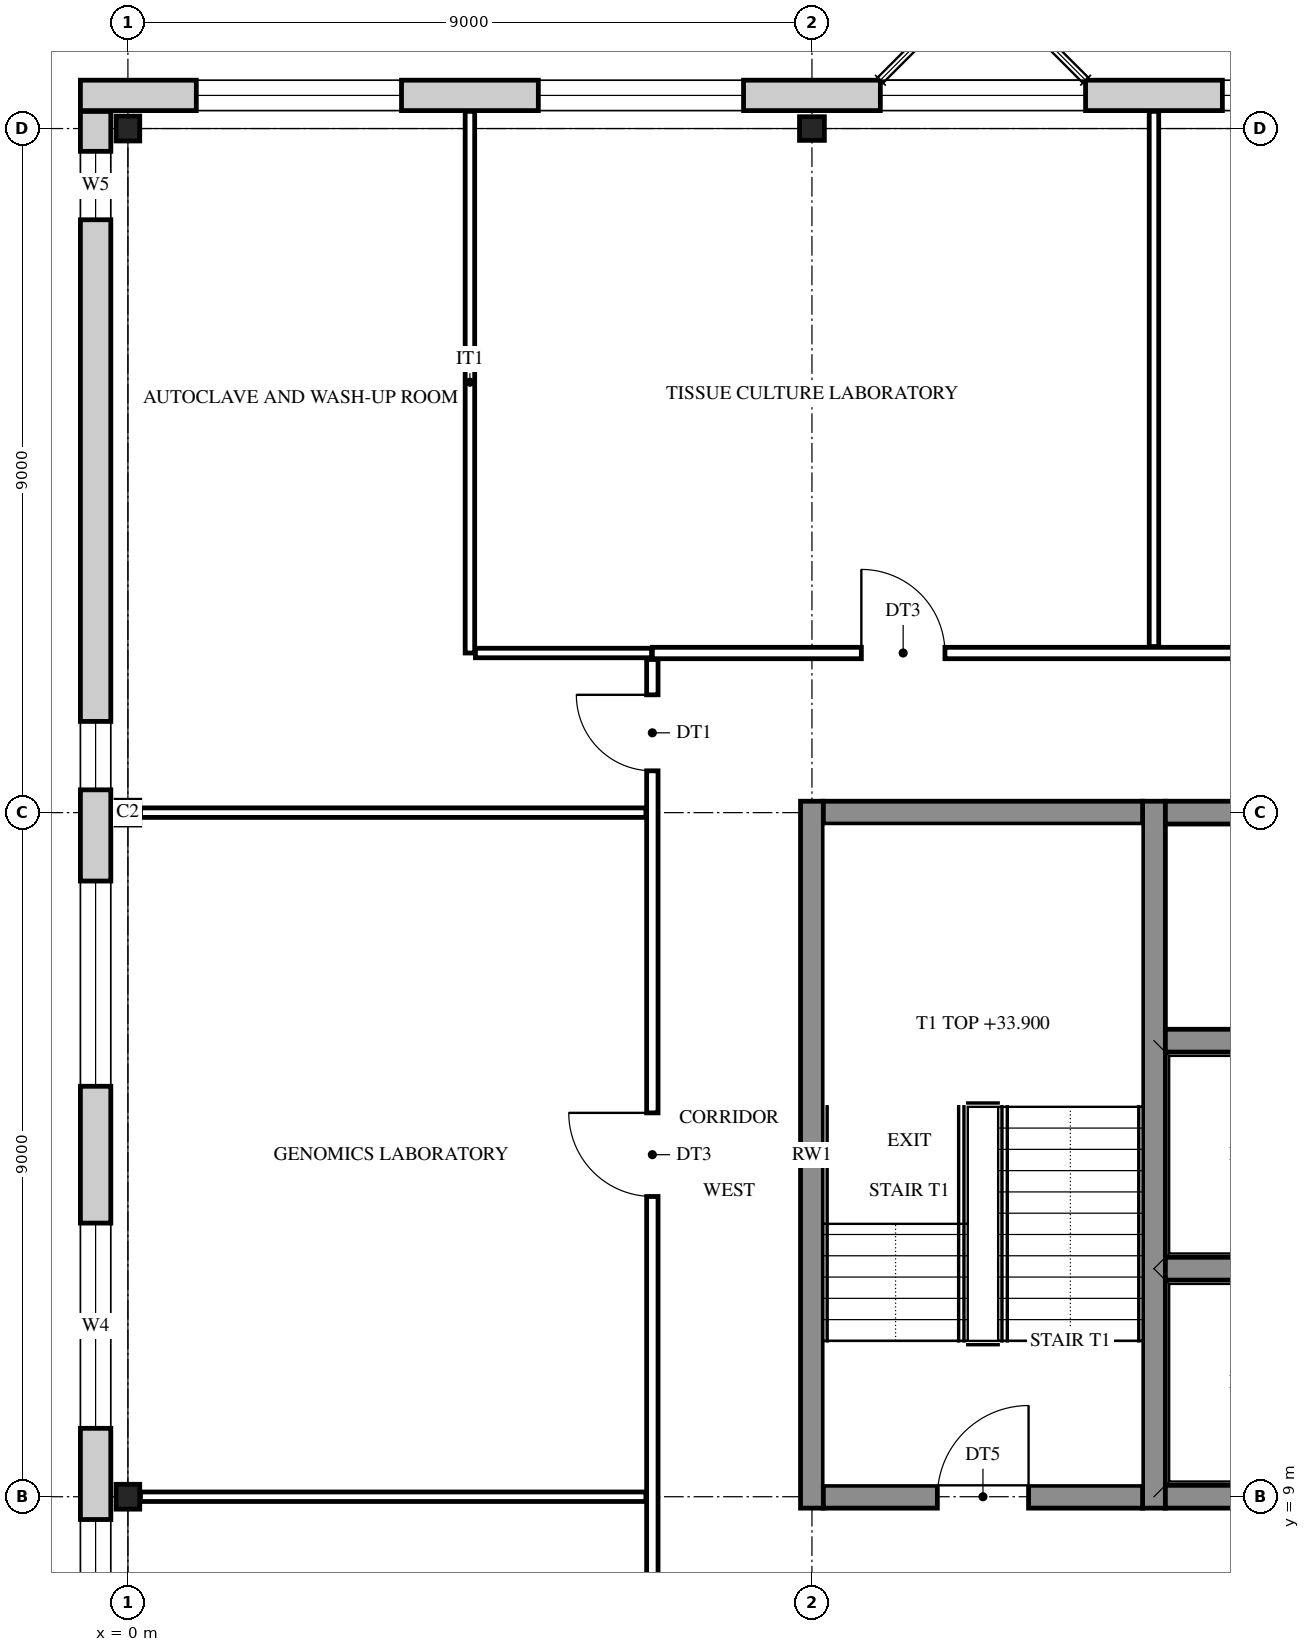
"""IFC4 building model, lengths in metres.
Left out: names, types, materials, properties, quantities, classifications, styles, units other than length and angle.
Written with IfcOpenShell. Run it as: python <this file> out.ifc"""

import sys

from ifc_helpers import new_model, si_unit, direction, frame, frame_2d, origin, origin_2d, place, context, subcontext, project, spatial, rectangle, i_section, extrude, element, fill, save


model = new_model("IFC4")
c1 = context("Model", 3, precision=1e-05, world=origin(), true_north=direction((0.0, 1.0)))
c2 = subcontext(c1, "Body", "Model", "MODEL_VIEW")
j1 = project(units=[si_unit("LENGTHUNIT", "METRE"), si_unit("PLANEANGLEUNIT", "RADIAN")], contexts=[c1])
p1 = place(None, origin())
s1 = spatial("IfcSite", under=j1, at=p1, CompositionType="ELEMENT")
p2 = place(p1, origin())
s2 = spatial("IfcBuilding", under=s1, at=p2, CompositionType="ELEMENT")
p3 = place(p2, frame((0.0, 0.0, 31.8)))
s3 = spatial("IfcBuildingStorey", under=s2, at=p3, CompositionType="ELEMENT", Elevation=31.8)
for number, where, z_axis, x_axis in (
    (1, (0.0, 9.0, 0.0), (0.0, 0.0, 1.0), (1.0, 0.0, 0.0)),
    (2, (0.0, 18.0, 0.0), (0.0, 0.0, 1.0), (1.0, 0.0, 0.0)),
    (3, (0.0, 27.0, 0.0), (0.0, 0.0, 1.0), (1.0, 0.0, 0.0)),
    (4, (9.0, 27.0, 0.0), (0.0, 0.0, 1.0), (0.0, 1.0, 0.0)),
):
    element("IfcColumn", number, at=place(p3, frame(where, z_axis=z_axis, x_axis=x_axis)), inside=s3, PredefinedType="COLUMN", context=c2, shape_type="SweptSolid", body=[
        extrude(i_section(OverallWidth=0.311, OverallDepth=0.327, WebThickness=0.016, FlangeThickness=0.025, FilletRadius=0.017, at=origin_2d()), origin(), (0.0, 0.0, 1.0), 4.2),
    ])
for number, where, z_axis, x_axis in (
    (5, (9.0, 8.85, 0.0), (0.0, 0.0, 1.0), (0.0, 1.0, 0.0)),
    (6, (13.5, 8.85, 0.0), (0.0, 0.0, 1.0), (0.0, 1.0, 0.0)),
):
    element("IfcWall", number, at=place(p3, frame(where, z_axis=z_axis, x_axis=x_axis)), inside=s3, PredefinedType="SHEAR", context=c2, shape_type="SweptSolid", body=[
        extrude(rectangle(XDim=9.3, YDim=0.3, at=frame_2d((4.65, 0.0))), origin(), (0.0, 0.0, 1.0), 4.2),
    ])
p4 = place(p3, frame((9.15, 9.0, 0.0), z_axis=(0.0, 0.0, 1.0), x_axis=(1.0, 0.0, 0.0)))
e7 = element("IfcWall", 7, at=p4, inside=s3, PredefinedType="SHEAR", context=c2, shape_type="SweptSolid", body=[
    extrude(rectangle(XDim=4.2, YDim=0.3, at=frame_2d((2.1, 0.0))), origin(), (0.0, 0.0, 1.0), 4.2),
])
p5 = place(p4, frame((1.5, 0.0, 0.0)))
e8 = element("IfcOpeningElement", 8, at=p5, cuts=e7, PredefinedType="OPENING", context=c2, shape_type="SweptSolid", body=[
    extrude(rectangle(XDim=1.2, YDim=2.1, at=frame_2d((0.6, 1.05))), frame((0.0, 0.16, 0.0), z_axis=(0.0, -1.0, 0.0), x_axis=(1.0, 0.0, 0.0)), (0.0, 0.0, 1.0), 0.32),
])
for number, where, z_axis, x_axis in (
    (9, (13.65, 9.0, 0.0), (0.0, 0.0, 1.0), (1.0, 0.0, 0.0)),
    (10, (13.65, 12.0, 0.0), (0.0, 0.0, 1.0), (1.0, 0.0, 0.0)),
    (11, (13.65, 15.0, 0.0), (0.0, 0.0, 1.0), (1.0, 0.0, 0.0)),
):
    element("IfcWall", number, at=place(p3, frame(where, z_axis=z_axis, x_axis=x_axis)), inside=s3, PredefinedType="SHEAR", context=c2, shape_type="SweptSolid", body=[
        extrude(rectangle(XDim=2.7, YDim=0.3, at=frame_2d((1.35, 0.0))), origin(), (0.0, 0.0, 1.0), 4.2),
    ])
p6 = place(p3, frame((9.15, 18.0, 0.0), z_axis=(0.0, 0.0, 1.0), x_axis=(1.0, 0.0, 0.0)))
e12 = element("IfcWall", 12, at=p6, inside=s3, PredefinedType="SHEAR", context=c2, shape_type="SweptSolid", body=[
    extrude(rectangle(XDim=4.2, YDim=0.3, at=frame_2d((2.1, 0.0))), origin(), (0.0, 0.0, 1.0), 4.2),
])
p7 = place(p3, frame((13.65, 18.0, 0.0), z_axis=(0.0, 0.0, 1.0), x_axis=(1.0, 0.0, 0.0)))
e13 = element("IfcWall", 13, at=p7, inside=s3, PredefinedType="SHEAR", context=c2, shape_type="SweptSolid", body=[
    extrude(rectangle(XDim=2.7, YDim=0.3, at=frame_2d((1.35, 0.0))), origin(), (0.0, 0.0, 1.0), 4.2),
])
p8 = place(p3, frame((-0.425, -0.225, 0.0), z_axis=(0.0, 0.0, 1.0), x_axis=(0.0, 1.0, 0.0)))
e14 = element("IfcWall", 14, at=p8, inside=s3, PredefinedType="STANDARD", context=c2, shape_type="SweptSolid", body=[
    extrude(rectangle(XDim=27.45, YDim=0.4, at=frame_2d((13.725, 0.0))), origin(), (0.0, 0.0, 1.0), 4.2),
])
p9 = place(p8, frame((0.525, 0.0, 0.9)))
e15 = element("IfcOpeningElement", 15, at=p9, cuts=e14, PredefinedType="OPENING", context=c2, shape_type="SweptSolid", body=[
    extrude(rectangle(XDim=0.9, YDim=2.0, at=frame_2d((0.45, 1.0))), frame((0.0, 0.21, 0.0), z_axis=(0.0, -1.0, 0.0), x_axis=(1.0, 0.0, 0.0)), (0.0, 0.0, 1.0), 0.42),
])
p10 = place(p8, frame((8.025, 0.0, 0.9)))
e16 = element("IfcOpeningElement", 16, at=p10, cuts=e14, PredefinedType="OPENING", context=c2, shape_type="SweptSolid", body=[
    extrude(rectangle(XDim=0.9, YDim=2.0, at=frame_2d((0.45, 1.0))), frame((0.0, 0.21, 0.0), z_axis=(0.0, -1.0, 0.0), x_axis=(1.0, 0.0, 0.0)), (0.0, 0.0, 1.0), 0.42),
])
p11 = place(p8, frame((10.125, 0.0, 0.9)))
e17 = element("IfcOpeningElement", 17, at=p11, cuts=e14, PredefinedType="OPENING", context=c2, shape_type="SweptSolid", body=[
    extrude(rectangle(XDim=2.7, YDim=2.5, at=frame_2d((1.35, 1.25))), frame((0.0, 0.21, 0.0), z_axis=(0.0, -1.0, 0.0), x_axis=(1.0, 0.0, 0.0)), (0.0, 0.0, 1.0), 0.42),
])
p12 = place(p8, frame((14.625, 0.0, 0.9)))
e18 = element("IfcOpeningElement", 18, at=p12, cuts=e14, PredefinedType="OPENING", context=c2, shape_type="SweptSolid", body=[
    extrude(rectangle(XDim=2.7, YDim=2.5, at=frame_2d((1.35, 1.25))), frame((0.0, 0.21, 0.0), z_axis=(0.0, -1.0, 0.0), x_axis=(1.0, 0.0, 0.0)), (0.0, 0.0, 1.0), 0.42),
])
p13 = place(p8, frame((18.525, 0.0, 0.9)))
e19 = element("IfcOpeningElement", 19, at=p13, cuts=e14, PredefinedType="OPENING", context=c2, shape_type="SweptSolid", body=[
    extrude(rectangle(XDim=0.9, YDim=2.0, at=frame_2d((0.45, 1.0))), frame((0.0, 0.21, 0.0), z_axis=(0.0, -1.0, 0.0), x_axis=(1.0, 0.0, 0.0)), (0.0, 0.0, 1.0), 0.42),
])
p14 = place(p8, frame((26.025, 0.0, 0.9)))
e20 = element("IfcOpeningElement", 20, at=p14, cuts=e14, PredefinedType="OPENING", context=c2, shape_type="SweptSolid", body=[
    extrude(rectangle(XDim=0.9, YDim=2.0, at=frame_2d((0.45, 1.0))), frame((0.0, 0.21, 0.0), z_axis=(0.0, -1.0, 0.0), x_axis=(1.0, 0.0, 0.0)), (0.0, 0.0, 1.0), 0.42),
])
p15 = place(p3, frame((-0.625, 27.436, 0.0), z_axis=(0.0, 0.0, 1.0), x_axis=(1.0, 0.0, 0.0)))
e21 = element("IfcWall", 21, at=p15, inside=s3, PredefinedType="STANDARD", context=c2, shape_type="SweptSolid", body=[
    extrude(rectangle(XDim=32.75, YDim=0.4, at=frame_2d((16.375, 0.0))), origin(), (0.0, 0.0, 1.0), 4.2),
])
p16 = place(p15, frame((1.525, 0.0, 0.9)))
e22 = element("IfcOpeningElement", 22, at=p16, cuts=e21, PredefinedType="OPENING", context=c2, shape_type="SweptSolid", body=[
    extrude(rectangle(XDim=2.7, YDim=2.5, at=frame_2d((1.35, 1.25))), frame((0.0, 0.21, 0.0), z_axis=(0.0, -1.0, 0.0), x_axis=(1.0, 0.0, 0.0)), (0.0, 0.0, 1.0), 0.42),
])
p17 = place(p15, frame((6.025, 0.0, 0.9)))
e23 = element("IfcOpeningElement", 23, at=p17, cuts=e21, PredefinedType="OPENING", context=c2, shape_type="SweptSolid", body=[
    extrude(rectangle(XDim=2.7, YDim=2.5, at=frame_2d((1.35, 1.25))), frame((0.0, 0.21, 0.0), z_axis=(0.0, -1.0, 0.0), x_axis=(1.0, 0.0, 0.0)), (0.0, 0.0, 1.0), 0.42),
])
p18 = place(p15, frame((10.525, 0.0, 0.9)))
e24 = element("IfcOpeningElement", 24, at=p18, cuts=e21, PredefinedType="OPENING", context=c2, shape_type="SweptSolid", body=[
    extrude(rectangle(XDim=2.7, YDim=2.5, at=frame_2d((1.35, 1.25))), frame((0.0, 0.21, 0.0), z_axis=(0.0, -1.0, 0.0), x_axis=(1.0, 0.0, 0.0)), (0.0, 0.0, 1.0), 0.42),
])
p19 = place(p15, frame((15.025, 0.0, 0.9)))
e25 = element("IfcOpeningElement", 25, at=p19, cuts=e21, PredefinedType="OPENING", context=c2, shape_type="SweptSolid", body=[
    extrude(rectangle(XDim=2.7, YDim=2.5, at=frame_2d((1.35, 1.25))), frame((0.0, 0.21, 0.0), z_axis=(0.0, -1.0, 0.0), x_axis=(1.0, 0.0, 0.0)), (0.0, 0.0, 1.0), 0.42),
])
p20 = place(p15, frame((19.525, 0.0, 0.9)))
e26 = element("IfcOpeningElement", 26, at=p20, cuts=e21, PredefinedType="OPENING", context=c2, shape_type="SweptSolid", body=[
    extrude(rectangle(XDim=2.7, YDim=2.5, at=frame_2d((1.35, 1.25))), frame((0.0, 0.21, 0.0), z_axis=(0.0, -1.0, 0.0), x_axis=(1.0, 0.0, 0.0)), (0.0, 0.0, 1.0), 0.42),
])
p21 = place(p15, frame((24.025, 0.0, 0.9)))
e27 = element("IfcOpeningElement", 27, at=p21, cuts=e21, PredefinedType="OPENING", context=c2, shape_type="SweptSolid", body=[
    extrude(rectangle(XDim=2.7, YDim=2.5, at=frame_2d((1.35, 1.25))), frame((0.0, 0.21, 0.0), z_axis=(0.0, -1.0, 0.0), x_axis=(1.0, 0.0, 0.0)), (0.0, 0.0, 1.0), 0.42),
])
p22 = place(p15, frame((28.525, 0.0, 0.9)))
e28 = element("IfcOpeningElement", 28, at=p22, cuts=e21, PredefinedType="OPENING", context=c2, shape_type="SweptSolid", body=[
    extrude(rectangle(XDim=2.7, YDim=2.5, at=frame_2d((1.35, 1.25))), frame((0.0, 0.21, 0.0), z_axis=(0.0, -1.0, 0.0), x_axis=(1.0, 0.0, 0.0)), (0.0, 0.0, 1.0), 0.42),
])
p23 = place(p3, frame((4.5, 20.1, 0.0), z_axis=(0.0, 0.0, 1.0), x_axis=(0.0, 1.0, 0.0)))
e29 = element("IfcWall", 29, at=p23, inside=s3, PredefinedType="PARTITIONING", context=c2, shape_type="SweptSolid", body=[
    extrude(rectangle(XDim=7.126, YDim=0.125, at=frame_2d((3.563, 0.0))), origin(), (0.0, 0.0, 1.0), 3.537),
])
p24 = place(p3, frame((6.9, 6.985, 0.0), z_axis=(0.0, 0.0, 1.0), x_axis=(0.0, 1.0, 0.0)))
e30 = element("IfcWall", 30, at=p24, inside=s3, PredefinedType="PARTITIONING", context=c2, shape_type="SweptSolid", body=[
    extrude(rectangle(XDim=13.03, YDim=0.15, at=frame_2d((6.515, 0.0))), origin(), (0.0, 0.0, 1.0), 3.537),
])
p25 = place(p24, frame((11.565, 0.0, 0.0)))
e31 = element("IfcOpeningElement", 31, at=p25, cuts=e30, PredefinedType="OPENING", context=c2, shape_type="SweptSolid", body=[
    extrude(rectangle(XDim=1.0, YDim=2.1, at=frame_2d((0.5, 1.05))), frame((0.0, 0.085, 0.0), z_axis=(0.0, -1.0, 0.0), x_axis=(1.0, 0.0, 0.0)), (0.0, 0.0, 1.0), 0.17),
])
p26 = place(p24, frame((5.965, 0.0, 0.0)))
e32 = element("IfcOpeningElement", 32, at=p26, cuts=e30, PredefinedType="OPENING", context=c2, shape_type="SweptSolid", body=[
    extrude(rectangle(XDim=1.1, YDim=2.1, at=frame_2d((0.55, 1.05))), frame((0.0, 0.085, 0.0), z_axis=(0.0, -1.0, 0.0), x_axis=(1.0, 0.0, 0.0)), (0.0, 0.0, 1.0), 0.17),
])
p27 = place(p3, frame((13.5, 20.185, 0.0), z_axis=(0.0, 0.0, 1.0), x_axis=(0.0, 1.0, 0.0)))
e33 = element("IfcWall", 33, at=p27, inside=s3, PredefinedType="PARTITIONING", context=c2, shape_type="SweptSolid", body=[
    extrude(rectangle(XDim=7.041, YDim=0.125, at=frame_2d((3.521, 0.0))), origin(), (0.0, 0.0, 1.0), 3.537),
])
for number, where, z_axis, x_axis in (
    (34, (0.166, 9.0, 0.0), (0.0, 0.0, 1.0), (1.0, 0.0, 0.0)),
    (35, (0.166, 18.0, 0.0), (0.0, 0.0, 1.0), (1.0, 0.0, 0.0)),
):
    element("IfcWall", number, at=place(p3, frame(where, z_axis=z_axis, x_axis=x_axis)), inside=s3, PredefinedType="PARTITIONING", context=c2, shape_type="SweptSolid", body=[
        extrude(rectangle(XDim=6.649, YDim=0.125, at=frame_2d((3.325, 0.0))), origin(), (0.0, 0.0, 1.0), 3.537),
    ])
p28 = place(p3, frame((4.573, 20.1, 0.0), z_axis=(0.0, 0.0, 1.0), x_axis=(1.0, 0.0, 0.0)))
e36 = element("IfcWall", 36, at=p28, inside=s3, PredefinedType="PARTITIONING", context=c2, shape_type="SweptSolid", body=[
    extrude(rectangle(XDim=2.317, YDim=0.125, at=frame_2d((1.159, 0.0))), origin(), (0.0, 0.0, 1.0), 3.537),
])
p29 = place(p3, frame((6.9, 20.1, 0.0), z_axis=(0.0, 0.0, 1.0), x_axis=(1.0, 0.0, 0.0)))
e37 = element("IfcWall", 37, at=p29, inside=s3, PredefinedType="PARTITIONING", context=c2, shape_type="SweptSolid", body=[
    extrude(rectangle(XDim=15.6, YDim=0.15, at=frame_2d((7.8, 0.0))), origin(), (0.0, 0.0, 1.0), 3.537),
])
p30 = place(p29, frame((2.75, 0.0, 0.0)))
e38 = element("IfcOpeningElement", 38, at=p30, cuts=e37, PredefinedType="OPENING", context=c2, shape_type="SweptSolid", body=[
    extrude(rectangle(XDim=1.1, YDim=2.1, at=frame_2d((0.55, 1.05))), frame((0.0, 0.085, 0.0), z_axis=(0.0, -1.0, 0.0), x_axis=(1.0, 0.0, 0.0)), (0.0, 0.0, 1.0), 0.17),
])
p31 = place(p29, frame((10.55, 0.0, 0.0)))
e39 = element("IfcOpeningElement", 39, at=p31, cuts=e37, PredefinedType="OPENING", context=c2, shape_type="SweptSolid", body=[
    extrude(rectangle(XDim=1.1, YDim=2.1, at=frame_2d((0.55, 1.05))), frame((0.0, 0.085, 0.0), z_axis=(0.0, -1.0, 0.0), x_axis=(1.0, 0.0, 0.0)), (0.0, 0.0, 1.0), 0.17),
])
p32 = place(p10, origin())
e40 = element("IfcWindow", 40, at=p32, inside=s3, PartitioningType="SINGLE_PANEL", PredefinedType="WINDOW", context=c2, shape_type="SweptSolid", body=[
    extrude(rectangle(XDim=0.9, YDim=2.0, at=frame_2d((0.45, 1.0))), frame((0.0, 0.03, 0.0), z_axis=(0.0, -1.0, 0.0), x_axis=(1.0, 0.0, 0.0)), (0.0, 0.0, 1.0), 0.06),
])
fill(e16, e40)
p33 = place(p11, origin())
e41 = element("IfcWindow", 41, at=p33, inside=s3, PartitioningType="SINGLE_PANEL", PredefinedType="WINDOW", context=c2, shape_type="SweptSolid", body=[
    extrude(rectangle(XDim=2.7, YDim=2.5, at=frame_2d((1.35, 1.25))), frame((0.0, 0.03, 0.0), z_axis=(0.0, -1.0, 0.0), x_axis=(1.0, 0.0, 0.0)), (0.0, 0.0, 1.0), 0.06),
])
fill(e17, e41)
p34 = place(p12, origin())
e42 = element("IfcWindow", 42, at=p34, inside=s3, PartitioningType="SINGLE_PANEL", PredefinedType="WINDOW", context=c2, shape_type="SweptSolid", body=[
    extrude(rectangle(XDim=2.7, YDim=2.5, at=frame_2d((1.35, 1.25))), frame((0.0, 0.03, 0.0), z_axis=(0.0, -1.0, 0.0), x_axis=(1.0, 0.0, 0.0)), (0.0, 0.0, 1.0), 0.06),
])
fill(e18, e42)
p35 = place(p13, origin())
e43 = element("IfcWindow", 43, at=p35, inside=s3, PartitioningType="SINGLE_PANEL", PredefinedType="WINDOW", context=c2, shape_type="SweptSolid", body=[
    extrude(rectangle(XDim=0.9, YDim=2.0, at=frame_2d((0.45, 1.0))), frame((0.0, 0.03, 0.0), z_axis=(0.0, -1.0, 0.0), x_axis=(1.0, 0.0, 0.0)), (0.0, 0.0, 1.0), 0.06),
])
fill(e19, e43)
p36 = place(p14, origin())
e44 = element("IfcWindow", 44, at=p36, inside=s3, PartitioningType="SINGLE_PANEL", PredefinedType="WINDOW", context=c2, shape_type="SweptSolid", body=[
    extrude(rectangle(XDim=0.9, YDim=2.0, at=frame_2d((0.45, 1.0))), frame((0.0, 0.03, 0.0), z_axis=(0.0, -1.0, 0.0), x_axis=(1.0, 0.0, 0.0)), (0.0, 0.0, 1.0), 0.06),
])
fill(e20, e44)
p37 = place(p16, origin())
e45 = element("IfcWindow", 45, at=p37, inside=s3, PartitioningType="SINGLE_PANEL", PredefinedType="WINDOW", context=c2, shape_type="SweptSolid", body=[
    extrude(rectangle(XDim=2.7, YDim=2.5, at=frame_2d((1.35, 1.25))), frame((0.0, 0.03, 0.0), z_axis=(0.0, -1.0, 0.0), x_axis=(1.0, 0.0, 0.0)), (0.0, 0.0, 1.0), 0.06),
])
fill(e22, e45)
p38 = place(p17, origin())
e46 = element("IfcWindow", 46, at=p38, inside=s3, PartitioningType="SINGLE_PANEL", PredefinedType="WINDOW", context=c2, shape_type="SweptSolid", body=[
    extrude(rectangle(XDim=2.7, YDim=2.5, at=frame_2d((1.35, 1.25))), frame((0.0, 0.03, 0.0), z_axis=(0.0, -1.0, 0.0), x_axis=(1.0, 0.0, 0.0)), (0.0, 0.0, 1.0), 0.06),
])
fill(e23, e46)
p39 = place(p18, origin())
e47 = element("IfcWindow", 47, at=p39, inside=s3, PartitioningType="SINGLE_PANEL", PredefinedType="WINDOW", context=c2, shape_type="SweptSolid", body=[
    extrude(rectangle(XDim=2.7, YDim=2.5, at=frame_2d((1.35, 1.25))), frame((0.0, 0.03, 0.0), z_axis=(0.0, -1.0, 0.0), x_axis=(1.0, 0.0, 0.0)), (0.0, 0.0, 1.0), 0.06),
])
fill(e24, e47)
p40 = place(p19, origin())
e48 = element("IfcWindow", 48, at=p40, inside=s3, PartitioningType="SINGLE_PANEL", PredefinedType="WINDOW", context=c2, shape_type="SweptSolid", body=[
    extrude(rectangle(XDim=2.7, YDim=2.5, at=frame_2d((1.35, 1.25))), frame((0.0, 0.03, 0.0), z_axis=(0.0, -1.0, 0.0), x_axis=(1.0, 0.0, 0.0)), (0.0, 0.0, 1.0), 0.06),
])
fill(e25, e48)
p41 = place(p5, origin())
e49 = element("IfcDoor", 49, at=p41, inside=s3, OperationType="SINGLE_SWING_RIGHT", PredefinedType="DOOR", context=c2, shape_type="SweptSolid", body=[
    extrude(rectangle(XDim=1.2, YDim=2.1, at=frame_2d((0.6, 1.05))), frame((0.0, 0.025, 0.0), z_axis=(0.0, -1.0, 0.0), x_axis=(1.0, 0.0, 0.0)), (0.0, 0.0, 1.0), 0.05),
])
fill(e8, e49)
p42 = place(p25, origin())
e50 = element("IfcDoor", 50, at=p42, inside=s3, OperationType="SINGLE_SWING_RIGHT", PredefinedType="DOOR", context=c2, shape_type="SweptSolid", body=[
    extrude(rectangle(XDim=1.0, YDim=2.1, at=frame_2d((0.5, 1.05))), frame((0.0, 0.025, 0.0), z_axis=(0.0, -1.0, 0.0), x_axis=(1.0, 0.0, 0.0)), (0.0, 0.0, 1.0), 0.05),
])
fill(e31, e50)
p43 = place(p30, origin())
e51 = element("IfcDoor", 51, at=p43, inside=s3, OperationType="SINGLE_SWING_LEFT", PredefinedType="DOOR", context=c2, shape_type="SweptSolid", body=[
    extrude(rectangle(XDim=1.1, YDim=2.1, at=frame_2d((0.55, 1.05))), frame((0.0, 0.025, 0.0), z_axis=(0.0, -1.0, 0.0), x_axis=(1.0, 0.0, 0.0)), (0.0, 0.0, 1.0), 0.05),
])
fill(e38, e51)
p44 = place(p26, origin())
e52 = element("IfcDoor", 52, at=p44, inside=s3, OperationType="SINGLE_SWING_RIGHT", PredefinedType="DOOR", context=c2, shape_type="SweptSolid", body=[
    extrude(rectangle(XDim=1.1, YDim=2.1, at=frame_2d((0.55, 1.05))), frame((0.0, 0.025, 0.0), z_axis=(0.0, -1.0, 0.0), x_axis=(1.0, 0.0, 0.0)), (0.0, 0.0, 1.0), 0.05),
])
fill(e32, e52)
save(model, sys.argv[1])
